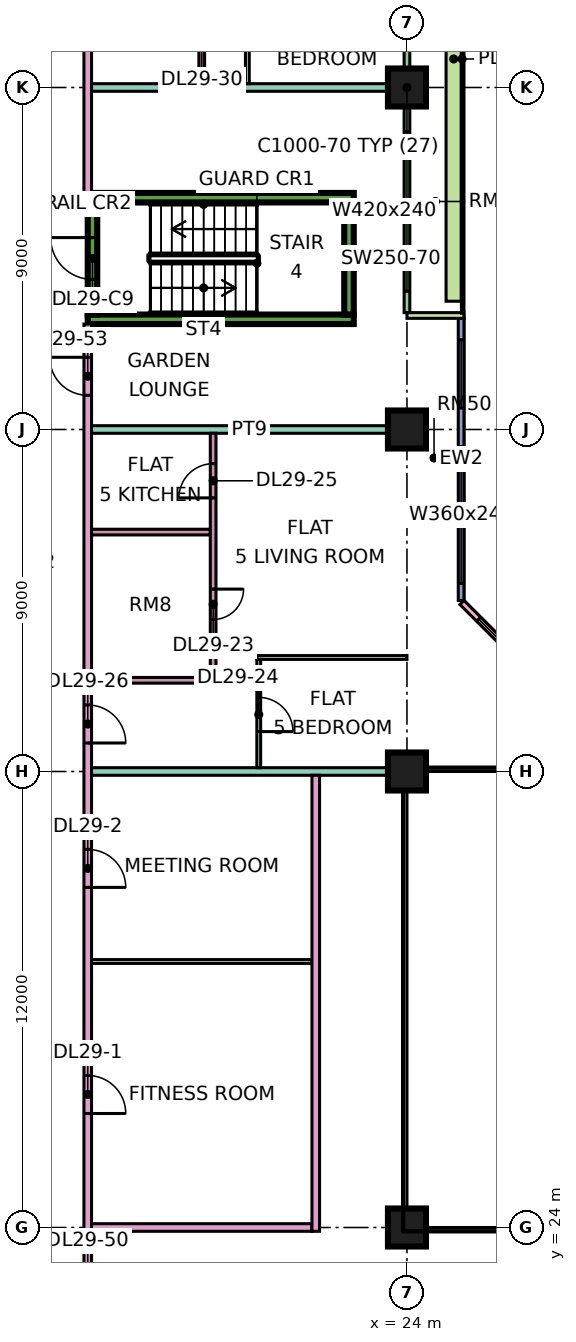
"""IFC4 building model, lengths in metres.
Left out: names, types, materials, properties, quantities, classifications, styles, units other than length and angle.
Written with IfcOpenShell. Run it as: python <this file> out.ifc"""

import sys

from ifc_helpers import new_model, si_unit, direction, frame, frame_2d, origin, origin_2d, place, context, subcontext, project, spatial, rectangle, extrude, element, fill, save


model = new_model("IFC4")
c1 = context("Model", 3, precision=1e-05, world=origin(), true_north=direction((0.0, 1.0)))
c2 = subcontext(c1, "Body", "Model", "MODEL_VIEW")
j1 = project(units=[si_unit("LENGTHUNIT", "METRE"), si_unit("PLANEANGLEUNIT", "RADIAN")], contexts=[c1])
p1 = place(None, origin())
s1 = spatial("IfcSite", under=j1, at=p1, CompositionType="ELEMENT")
p2 = place(p1, origin())
s2 = spatial("IfcBuilding", under=s1, at=p2, CompositionType="ELEMENT")
p3 = place(p2, frame((0.0, 0.0, 125.65)))
s3 = spatial("IfcBuildingStorey", under=s2, at=p3, CompositionType="ELEMENT", Elevation=125.65)
for number, where, z_axis, x_axis in (
    (1, (24.0, 24.0, 0.0), (0.0, 0.0, 1.0), (1.0, 0.0, 0.0)),
    (2, (24.0, 36.0, 0.0), (0.0, 0.0, 1.0), (1.0, 0.0, 0.0)),
    (3, (24.0, 45.0, 0.0), (0.0, 0.0, 1.0), (1.0, 0.0, 0.0)),
    (4, (24.0, 54.0, 0.0), (0.0, 0.0, 1.0), (1.0, 0.0, 0.0)),
):
    element("IfcColumn", number, at=place(p3, frame(where, z_axis=z_axis, x_axis=x_axis)), inside=s3, PredefinedType="COLUMN", context=c2, shape_type="SweptSolid", body=[
        extrude(rectangle(XDim=1.0, YDim=1.0, at=origin_2d()), origin(), (0.0, 0.0, 1.0), 3.75),
    ])
for number, where, z_axis, x_axis in (
    (5, (15.6, 47.9, 0.0), (0.0, 0.0, 1.0), (1.0, 0.0, 0.0)),
    (6, (15.6, 51.1, 0.0), (0.0, 0.0, 1.0), (1.0, 0.0, 0.0)),
):
    element("IfcWall", number, at=place(p3, frame(where, z_axis=z_axis, x_axis=x_axis)), inside=s3, PredefinedType="SHEAR", context=c2, shape_type="SweptSolid", body=[
        extrude(rectangle(XDim=7.0, YDim=0.25, at=frame_2d((3.5, 0.0))), origin(), (0.0, 0.0, 1.0), 3.75),
    ])
p4 = place(p3, frame((15.725, 48.025, 0.0), z_axis=(0.0, 0.0, 1.0), x_axis=(0.0, 1.0, 0.0)))
e7 = element("IfcWall", 7, at=p4, inside=s3, PredefinedType="SHEAR", context=c2, shape_type="SweptSolid", body=[
    extrude(rectangle(XDim=2.95, YDim=0.25, at=frame_2d((1.475, 0.0))), origin(), (0.0, 0.0, 1.0), 3.75),
])
p5 = place(p4, frame((0.925, 0.0, 0.0)))
e8 = element("IfcOpeningElement", 8, at=p5, cuts=e7, PredefinedType="OPENING", context=c2, shape_type="SweptSolid", body=[
    extrude(rectangle(XDim=1.1, YDim=2.2, at=frame_2d((0.55, 1.1))), frame((0.0, 0.135, 0.0), z_axis=(0.0, -1.0, 0.0), x_axis=(1.0, 0.0, 0.0)), (0.0, 0.0, 1.0), 0.27),
])
p6 = place(p3, frame((22.475, 48.025, 0.0), z_axis=(0.0, 0.0, 1.0), x_axis=(0.0, 1.0, 0.0)))
e9 = element("IfcWall", 9, at=p6, inside=s3, PredefinedType="SHEAR", context=c2, shape_type="SweptSolid", body=[
    extrude(rectangle(XDim=2.95, YDim=0.25, at=frame_2d((1.475, 0.0))), origin(), (0.0, 0.0, 1.0), 3.75),
])
p7 = place(p3, frame((28.447, 37.447, 0.0), z_axis=(0.0, 0.0, 1.0), x_axis=(-0.707106781187, 0.707106781187, 0.0)))
e10 = element("IfcWall", 10, at=p7, inside=s3, PredefinedType="SOLIDWALL", context=c2, shape_type="SweptSolid", body=[
    extrude(rectangle(XDim=4.243, YDim=0.15, at=frame_2d((2.121, 0.0))), origin(), (0.0, 0.0, 1.0), 3.35),
])
p8 = place(p7, frame((0.621, 0.0, 0.45)))
e11 = element("IfcOpeningElement", 11, at=p8, cuts=e10, PredefinedType="OPENING", context=c2, shape_type="SweptSolid", body=[
    extrude(rectangle(XDim=3.0, YDim=2.4, at=frame_2d((1.5, 1.2))), frame((0.0, 0.085, 0.0), z_axis=(0.0, -1.0, 0.0), x_axis=(1.0, 0.0, 0.0)), (0.0, 0.0, 1.0), 0.17),
])
p9 = place(p3, frame((25.425, 40.5, 0.0), z_axis=(0.0, 0.0, 1.0), x_axis=(0.0, 1.0, 0.0)))
e12 = element("IfcWall", 12, at=p9, inside=s3, PredefinedType="SOLIDWALL", context=c2, shape_type="SweptSolid", body=[
    extrude(rectangle(XDim=7.425, YDim=0.15, at=frame_2d((3.712, 0.0))), origin(), (0.0, 0.0, 1.0), 3.35),
])
p10 = place(p9, frame((0.45, 0.0, 0.45)))
e13 = element("IfcOpeningElement", 13, at=p10, cuts=e12, PredefinedType="OPENING", context=c2, shape_type="SweptSolid", body=[
    extrude(rectangle(XDim=3.6, YDim=2.4, at=frame_2d((1.8, 1.2))), frame((0.0, 0.085, 0.0), z_axis=(0.0, -1.0, 0.0), x_axis=(1.0, 0.0, 0.0)), (0.0, 0.0, 1.0), 0.17),
])
p11 = place(p9, frame((5.062, 0.0, 0.45)))
e14 = element("IfcOpeningElement", 14, at=p11, cuts=e12, PredefinedType="OPENING", context=c2, shape_type="SweptSolid", body=[
    extrude(rectangle(XDim=1.8, YDim=2.4, at=frame_2d((0.9, 1.2))), frame((0.0, 0.085, 0.0), z_axis=(0.0, -1.0, 0.0), x_axis=(1.0, 0.0, 0.0)), (0.0, 0.0, 1.0), 0.17),
])
p12 = place(p3, frame((24.0, 48.075, 0.0), z_axis=(0.0, 0.0, 1.0), x_axis=(0.0, 1.0, 0.0)))
e15 = element("IfcWall", 15, at=p12, inside=s3, PredefinedType="SOLIDWALL", context=c2, shape_type="SweptSolid", body=[
    extrude(rectangle(XDim=13.35, YDim=0.15, at=frame_2d((6.675, 0.0))), origin(), (0.0, 0.0, 1.0), 3.35),
])
p13 = place(p12, frame((0.562, 0.0, 0.45)))
e16 = element("IfcOpeningElement", 16, at=p13, cuts=e15, PredefinedType="OPENING", context=c2, shape_type="SweptSolid", body=[
    extrude(rectangle(XDim=4.2, YDim=2.4, at=frame_2d((2.1, 1.2))), frame((0.0, 0.085, 0.0), z_axis=(0.0, -1.0, 0.0), x_axis=(1.0, 0.0, 0.0)), (0.0, 0.0, 1.0), 0.17),
])
p14 = place(p12, frame((7.125, 0.0, 0.0)))
e17 = element("IfcOpeningElement", 17, at=p14, cuts=e15, PredefinedType="OPENING", context=c2, shape_type="SweptSolid", body=[
    extrude(rectangle(XDim=1.2, YDim=2.4, at=frame_2d((0.6, 1.2))), frame((0.0, 0.085, 0.0), z_axis=(0.0, -1.0, 0.0), x_axis=(1.0, 0.0, 0.0)), (0.0, 0.0, 1.0), 0.17),
])
p15 = place(p12, frame((9.525, 0.0, 0.45)))
e18 = element("IfcOpeningElement", 18, at=p15, cuts=e15, PredefinedType="OPENING", context=c2, shape_type="SweptSolid", body=[
    extrude(rectangle(XDim=1.8, YDim=2.4, at=frame_2d((0.9, 1.2))), frame((0.0, 0.085, 0.0), z_axis=(0.0, -1.0, 0.0), x_axis=(1.0, 0.0, 0.0)), (0.0, 0.0, 1.0), 0.17),
])
p16 = place(p3, frame((25.5, 48.0, 0.0), z_axis=(0.0, 0.0, 1.0), x_axis=(-1.0, 0.0, 0.0)))
e19 = element("IfcWall", 19, at=p16, inside=s3, PredefinedType="SOLIDWALL", context=c2, shape_type="SweptSolid", body=[
    extrude(rectangle(XDim=1.5, YDim=0.15, at=frame_2d((0.75, 0.0))), origin(), (0.0, 0.0, 1.0), 3.35),
])
p17 = place(p3, frame((25.229, 48.375, 0.0), z_axis=(0.0, 0.0, 1.0), x_axis=(0.0, 1.0, 0.0)))
e20 = element("IfcWall", 20, at=p17, inside=s3, PredefinedType="SOLIDWALL", context=c2, shape_type="SweptSolid", body=[
    extrude(rectangle(XDim=12.75, YDim=0.4, at=frame_2d((6.375, 0.0))), origin(), (0.0, 0.0, 1.0), 0.7),
])
p18 = place(p3, frame((15.6, 20.0, 0.0), z_axis=(0.0, 0.0, 1.0), x_axis=(0.0, 1.0, 0.0)))
e21 = element("IfcWall", 21, at=p18, inside=s3, PredefinedType="PARTITIONING", context=c2, shape_type="SweptSolid", body=[
    extrude(rectangle(XDim=27.775, YDim=0.2, at=frame_2d((13.887, 0.0))), origin(), (0.0, 0.0, 1.0), 3.35),
])
p19 = place(p18, frame((7.0, 0.0, 0.0)))
e22 = element("IfcOpeningElement", 22, at=p19, cuts=e21, PredefinedType="OPENING", context=c2, shape_type="SweptSolid", body=[
    extrude(rectangle(XDim=1.0, YDim=2.1, at=frame_2d((0.5, 1.05))), frame((0.0, 0.11, 0.0), z_axis=(0.0, -1.0, 0.0), x_axis=(1.0, 0.0, 0.0)), (0.0, 0.0, 1.0), 0.22),
])
p20 = place(p18, frame((12.95, 0.0, 0.0)))
e23 = element("IfcOpeningElement", 23, at=p20, cuts=e21, PredefinedType="OPENING", context=c2, shape_type="SweptSolid", body=[
    extrude(rectangle(XDim=1.0, YDim=2.1, at=frame_2d((0.5, 1.05))), frame((0.0, 0.11, 0.0), z_axis=(0.0, -1.0, 0.0), x_axis=(1.0, 0.0, 0.0)), (0.0, 0.0, 1.0), 0.22),
])
p21 = place(p18, frame((16.75, 0.0, 0.0)))
e24 = element("IfcOpeningElement", 24, at=p21, cuts=e21, PredefinedType="OPENING", context=c2, shape_type="SweptSolid", body=[
    extrude(rectangle(XDim=1.0, YDim=2.1, at=frame_2d((0.5, 1.05))), frame((0.0, 0.11, 0.0), z_axis=(0.0, -1.0, 0.0), x_axis=(1.0, 0.0, 0.0)), (0.0, 0.0, 1.0), 0.22),
])
p22 = place(p18, frame((1.15, 0.0, 0.0)))
e25 = element("IfcOpeningElement", 25, at=p22, cuts=e21, PredefinedType="OPENING", context=c2, shape_type="SweptSolid", body=[
    extrude(rectangle(XDim=1.8, YDim=2.1, at=frame_2d((0.9, 1.05))), frame((0.0, 0.11, 0.0), z_axis=(0.0, -1.0, 0.0), x_axis=(1.0, 0.0, 0.0)), (0.0, 0.0, 1.0), 0.22),
])
p23 = place(p18, frame((25.9, 0.0, 0.0)))
e26 = element("IfcOpeningElement", 26, at=p23, cuts=e21, PredefinedType="OPENING", context=c2, shape_type="SweptSolid", body=[
    extrude(rectangle(XDim=1.0, YDim=2.1, at=frame_2d((0.5, 1.05))), frame((0.0, 0.11, 0.0), z_axis=(0.0, -1.0, 0.0), x_axis=(1.0, 0.0, 0.0)), (0.0, 0.0, 1.0), 0.22),
])
p24 = place(p3, frame((15.6, 51.225, 0.0), z_axis=(0.0, 0.0, 1.0), x_axis=(0.0, 1.0, 0.0)))
e27 = element("IfcWall", 27, at=p24, inside=s3, PredefinedType="PARTITIONING", context=c2, shape_type="SweptSolid", body=[
    extrude(rectangle(XDim=13.125, YDim=0.2, at=frame_2d((6.562, 0.0))), origin(), (0.0, 0.0, 1.0), 3.35),
])
p25 = place(p24, frame((9.975, 0.0, 0.0)))
e28 = element("IfcOpeningElement", 28, at=p25, cuts=e27, PredefinedType="OPENING", context=c2, shape_type="SweptSolid", body=[
    extrude(rectangle(XDim=1.0, YDim=2.1, at=frame_2d((0.5, 1.05))), frame((0.0, 0.11, 0.0), z_axis=(0.0, -1.0, 0.0), x_axis=(1.0, 0.0, 0.0)), (0.0, 0.0, 1.0), 0.22),
])
p26 = place(p3, frame((15.7, 24.0, 0.0), z_axis=(0.0, 0.0, 1.0), x_axis=(1.0, 0.0, 0.0)))
e29 = element("IfcWall", 29, at=p26, inside=s3, PredefinedType="PARTITIONING", context=c2, shape_type="SweptSolid", body=[
    extrude(rectangle(XDim=5.8, YDim=0.2, at=frame_2d((2.9, 0.0))), origin(), (0.0, 0.0, 1.0), 3.35),
])
p27 = place(p3, frame((15.7, 31.0, 0.0), z_axis=(0.0, 0.0, 1.0), x_axis=(1.0, 0.0, 0.0)))
e30 = element("IfcWall", 30, at=p27, inside=s3, PredefinedType="PARTITIONING", context=c2, shape_type="SweptSolid", body=[
    extrude(rectangle(XDim=5.8, YDim=0.1, at=frame_2d((2.9, 0.0))), origin(), (0.0, 0.0, 1.0), 3.35),
])
p28 = place(p3, frame((15.7, 36.0, 0.0), z_axis=(0.0, 0.0, 1.0), x_axis=(1.0, 0.0, 0.0)))
e31 = element("IfcWall", 31, at=p28, inside=s3, PredefinedType="PARTITIONING", context=c2, shape_type="SweptSolid", body=[
    extrude(rectangle(XDim=8.3, YDim=0.2, at=frame_2d((4.15, 0.0))), origin(), (0.0, 0.0, 1.0), 3.35),
])
for number, where, z_axis, x_axis in (
    (32, (15.7, 38.4, 0.0), (0.0, 0.0, 1.0), (1.0, 0.0, 0.0)),
    (33, (15.7, 42.3, 0.0), (0.0, 0.0, 1.0), (1.0, 0.0, 0.0)),
):
    element("IfcWall", number, at=place(p3, frame(where, z_axis=z_axis, x_axis=x_axis)), inside=s3, PredefinedType="PARTITIONING", context=c2, shape_type="SweptSolid", body=[
        extrude(rectangle(XDim=3.125, YDim=0.15, at=frame_2d((1.562, 0.0))), origin(), (0.0, 0.0, 1.0), 3.35),
    ])
p29 = place(p3, frame((15.7, 45.0, 0.0), z_axis=(0.0, 0.0, 1.0), x_axis=(1.0, 0.0, 0.0)))
e34 = element("IfcWall", 34, at=p29, inside=s3, PredefinedType="PARTITIONING", context=c2, shape_type="SweptSolid", body=[
    extrude(rectangle(XDim=8.3, YDim=0.2, at=frame_2d((4.15, 0.0))), origin(), (0.0, 0.0, 1.0), 3.35),
])
p30 = place(p3, frame((15.7, 54.0, 0.0), z_axis=(0.0, 0.0, 1.0), x_axis=(1.0, 0.0, 0.0)))
e35 = element("IfcWall", 35, at=p30, inside=s3, PredefinedType="PARTITIONING", context=c2, shape_type="SweptSolid", body=[
    extrude(rectangle(XDim=8.226, YDim=0.2, at=frame_2d((4.113, 0.0))), origin(), (0.0, 0.0, 1.0), 3.35),
])
p31 = place(p3, frame((18.6, 54.1, 0.0), z_axis=(0.0, 0.0, 1.0), x_axis=(0.0, 1.0, 0.0)))
e36 = element("IfcWall", 36, at=p31, inside=s3, PredefinedType="PARTITIONING", context=c2, shape_type="SweptSolid", body=[
    extrude(rectangle(XDim=6.275, YDim=0.15, at=frame_2d((3.137, 0.0))), origin(), (0.0, 0.0, 1.0), 3.35),
])
p32 = place(p31, frame((4.5, 0.0, 0.0)))
e37 = element("IfcOpeningElement", 37, at=p32, cuts=e36, PredefinedType="OPENING", context=c2, shape_type="SweptSolid", body=[
    extrude(rectangle(XDim=0.8, YDim=2.1, at=frame_2d((0.4, 1.05))), frame((0.0, 0.085, 0.0), z_axis=(0.0, -1.0, 0.0), x_axis=(1.0, 0.0, 0.0)), (0.0, 0.0, 1.0), 0.17),
])
p33 = place(p31, frame((1.25, 0.0, 0.0)))
e38 = element("IfcOpeningElement", 38, at=p33, cuts=e36, PredefinedType="OPENING", context=c2, shape_type="SweptSolid", body=[
    extrude(rectangle(XDim=0.9, YDim=2.1, at=frame_2d((0.45, 1.05))), frame((0.0, 0.085, 0.0), z_axis=(0.0, -1.0, 0.0), x_axis=(1.0, 0.0, 0.0)), (0.0, 0.0, 1.0), 0.17),
])
p34 = place(p3, frame((18.9, 38.325, 0.0), z_axis=(0.0, 0.0, 1.0), x_axis=(0.0, 1.0, 0.0)))
e39 = element("IfcWall", 39, at=p34, inside=s3, PredefinedType="PARTITIONING", context=c2, shape_type="SweptSolid", body=[
    extrude(rectangle(XDim=6.575, YDim=0.15, at=frame_2d((3.288, 0.0))), origin(), (0.0, 0.0, 1.0), 3.35),
])
p35 = place(p34, frame((1.675, 0.0, 0.0)))
e40 = element("IfcOpeningElement", 40, at=p35, cuts=e39, PredefinedType="OPENING", context=c2, shape_type="SweptSolid", body=[
    extrude(rectangle(XDim=0.8, YDim=2.1, at=frame_2d((0.4, 1.05))), frame((0.0, 0.085, 0.0), z_axis=(0.0, -1.0, 0.0), x_axis=(1.0, 0.0, 0.0)), (0.0, 0.0, 1.0), 0.17),
])
p36 = place(p34, frame((4.875, 0.0, 0.0)))
e41 = element("IfcOpeningElement", 41, at=p36, cuts=e39, PredefinedType="OPENING", context=c2, shape_type="SweptSolid", body=[
    extrude(rectangle(XDim=0.9, YDim=2.1, at=frame_2d((0.45, 1.05))), frame((0.0, 0.085, 0.0), z_axis=(0.0, -1.0, 0.0), x_axis=(1.0, 0.0, 0.0)), (0.0, 0.0, 1.0), 0.17),
])
p37 = place(p3, frame((19.8, 54.1, 0.0), z_axis=(0.0, 0.0, 1.0), x_axis=(0.0, 1.0, 0.0)))
e42 = element("IfcWall", 42, at=p37, inside=s3, PredefinedType="PARTITIONING", context=c2, shape_type="SweptSolid", body=[
    extrude(rectangle(XDim=5.95, YDim=0.1, at=frame_2d((2.975, 0.0))), origin(), (0.0, 0.0, 1.0), 3.35),
])
p38 = place(p37, frame((0.95, 0.0, 0.0)))
e43 = element("IfcOpeningElement", 43, at=p38, cuts=e42, PredefinedType="OPENING", context=c2, shape_type="SweptSolid", body=[
    extrude(rectangle(XDim=0.9, YDim=2.1, at=frame_2d((0.45, 1.05))), frame((0.0, 0.06, 0.0), z_axis=(0.0, -1.0, 0.0), x_axis=(1.0, 0.0, 0.0)), (0.0, 0.0, 1.0), 0.12),
])
p39 = place(p3, frame((20.05, 39.0, 0.0), z_axis=(0.0, 0.0, 1.0), x_axis=(1.0, 0.0, 0.0)))
e44 = element("IfcWall", 44, at=p39, inside=s3, PredefinedType="PARTITIONING", context=c2, shape_type="SweptSolid", body=[
    extrude(rectangle(XDim=3.95, YDim=0.1, at=frame_2d((1.975, 0.0))), origin(), (0.0, 0.0, 1.0), 3.35),
])
p40 = place(p3, frame((20.1, 36.1, 0.0), z_axis=(0.0, 0.0, 1.0), x_axis=(0.0, 1.0, 0.0)))
e45 = element("IfcWall", 45, at=p40, inside=s3, PredefinedType="PARTITIONING", context=c2, shape_type="SweptSolid", body=[
    extrude(rectangle(XDim=2.85, YDim=0.1, at=frame_2d((1.425, 0.0))), origin(), (0.0, 0.0, 1.0), 3.35),
])
p41 = place(p40, frame((0.95, 0.0, 0.0)))
e46 = element("IfcOpeningElement", 46, at=p41, cuts=e45, PredefinedType="OPENING", context=c2, shape_type="SweptSolid", body=[
    extrude(rectangle(XDim=0.9, YDim=2.1, at=frame_2d((0.45, 1.05))), frame((0.0, 0.06, 0.0), z_axis=(0.0, -1.0, 0.0), x_axis=(1.0, 0.0, 0.0)), (0.0, 0.0, 1.0), 0.12),
])
p42 = place(p3, frame((21.6, 23.9, 0.0), z_axis=(0.0, 0.0, 1.0), x_axis=(0.0, 1.0, 0.0)))
e47 = element("IfcWall", 47, at=p42, inside=s3, PredefinedType="PARTITIONING", context=c2, shape_type="SweptSolid", body=[
    extrude(rectangle(XDim=12.0, YDim=0.2, at=frame_2d((6.0, 0.0))), origin(), (0.0, 0.0, 1.0), 3.35),
])
p43 = place(p8, origin())
e48 = element("IfcWindow", 48, at=p43, inside=s3, PartitioningType="SINGLE_PANEL", PredefinedType="WINDOW", context=c2, shape_type="SweptSolid", body=[
    extrude(rectangle(XDim=3.0, YDim=2.4, at=frame_2d((1.5, 1.2))), frame((0.0, 0.03, 0.0), z_axis=(0.0, -1.0, 0.0), x_axis=(1.0, 0.0, 0.0)), (0.0, 0.0, 1.0), 0.06),
])
fill(e11, e48)
p44 = place(p10, origin())
e49 = element("IfcWindow", 49, at=p44, inside=s3, PartitioningType="SINGLE_PANEL", PredefinedType="WINDOW", context=c2, shape_type="SweptSolid", body=[
    extrude(rectangle(XDim=3.6, YDim=2.4, at=frame_2d((1.8, 1.2))), frame((0.0, 0.03, 0.0), z_axis=(0.0, -1.0, 0.0), x_axis=(1.0, 0.0, 0.0)), (0.0, 0.0, 1.0), 0.06),
])
fill(e13, e49)
p45 = place(p11, origin())
e50 = element("IfcWindow", 50, at=p45, inside=s3, PartitioningType="SINGLE_PANEL", PredefinedType="WINDOW", context=c2, shape_type="SweptSolid", body=[
    extrude(rectangle(XDim=1.8, YDim=2.4, at=frame_2d((0.9, 1.2))), frame((0.0, 0.03, 0.0), z_axis=(0.0, -1.0, 0.0), x_axis=(1.0, 0.0, 0.0)), (0.0, 0.0, 1.0), 0.06),
])
fill(e14, e50)
p46 = place(p13, origin())
e51 = element("IfcWindow", 51, at=p46, inside=s3, PartitioningType="SINGLE_PANEL", PredefinedType="WINDOW", context=c2, shape_type="SweptSolid", body=[
    extrude(rectangle(XDim=4.2, YDim=2.4, at=frame_2d((2.1, 1.2))), frame((0.0, 0.03, 0.0), z_axis=(0.0, -1.0, 0.0), x_axis=(1.0, 0.0, 0.0)), (0.0, 0.0, 1.0), 0.06),
])
fill(e16, e51)
p47 = place(p5, frame((1.1, 0.0, 0.0), z_axis=(0.0, 0.0, 1.0), x_axis=(-1.0, 0.0, 0.0)))
e52 = element("IfcDoor", 52, at=p47, inside=s3, OperationType="SINGLE_SWING_RIGHT", PredefinedType="DOOR", context=c2, shape_type="SweptSolid", body=[
    extrude(rectangle(XDim=1.1, YDim=2.2, at=frame_2d((0.55, 1.1))), frame((0.0, 0.025, 0.0), z_axis=(0.0, -1.0, 0.0), x_axis=(1.0, 0.0, 0.0)), (0.0, 0.0, 1.0), 0.05),
])
fill(e8, e52)
p48 = place(p19, frame((1.0, 0.0, 0.0), z_axis=(0.0, 0.0, 1.0), x_axis=(-1.0, 0.0, 0.0)))
e53 = element("IfcDoor", 53, at=p48, inside=s3, OperationType="SINGLE_SWING_LEFT", PredefinedType="DOOR", context=c2, shape_type="SweptSolid", body=[
    extrude(rectangle(XDim=1.0, YDim=2.1, at=frame_2d((0.5, 1.05))), frame((0.0, 0.025, 0.0), z_axis=(0.0, -1.0, 0.0), x_axis=(1.0, 0.0, 0.0)), (0.0, 0.0, 1.0), 0.05),
])
fill(e22, e53)
p49 = place(p20, frame((1.0, 0.0, 0.0), z_axis=(0.0, 0.0, 1.0), x_axis=(-1.0, 0.0, 0.0)))
e54 = element("IfcDoor", 54, at=p49, inside=s3, OperationType="SINGLE_SWING_LEFT", PredefinedType="DOOR", context=c2, shape_type="SweptSolid", body=[
    extrude(rectangle(XDim=1.0, YDim=2.1, at=frame_2d((0.5, 1.05))), frame((0.0, 0.025, 0.0), z_axis=(0.0, -1.0, 0.0), x_axis=(1.0, 0.0, 0.0)), (0.0, 0.0, 1.0), 0.05),
])
fill(e23, e54)
p50 = place(p35, origin())
e55 = element("IfcDoor", 55, at=p50, inside=s3, OperationType="SINGLE_SWING_RIGHT", PredefinedType="DOOR", context=c2, shape_type="SweptSolid", body=[
    extrude(rectangle(XDim=0.8, YDim=2.1, at=frame_2d((0.4, 1.05))), frame((0.0, 0.025, 0.0), z_axis=(0.0, -1.0, 0.0), x_axis=(1.0, 0.0, 0.0)), (0.0, 0.0, 1.0), 0.05),
])
fill(e40, e55)
p51 = place(p41, frame((0.9, 0.0, 0.0), z_axis=(0.0, 0.0, 1.0), x_axis=(-1.0, 0.0, 0.0)))
e56 = element("IfcDoor", 56, at=p51, inside=s3, OperationType="SINGLE_SWING_LEFT", PredefinedType="DOOR", context=c2, shape_type="SweptSolid", body=[
    extrude(rectangle(XDim=0.9, YDim=2.1, at=frame_2d((0.45, 1.05))), frame((0.0, 0.025, 0.0), z_axis=(0.0, -1.0, 0.0), x_axis=(1.0, 0.0, 0.0)), (0.0, 0.0, 1.0), 0.05),
])
fill(e46, e56)
p52 = place(p36, origin())
e57 = element("IfcDoor", 57, at=p52, inside=s3, OperationType="SINGLE_SWING_LEFT", PredefinedType="DOOR", context=c2, shape_type="SweptSolid", body=[
    extrude(rectangle(XDim=0.9, YDim=2.1, at=frame_2d((0.45, 1.05))), frame((0.0, 0.025, 0.0), z_axis=(0.0, -1.0, 0.0), x_axis=(1.0, 0.0, 0.0)), (0.0, 0.0, 1.0), 0.05),
])
fill(e41, e57)
p53 = place(p21, frame((1.0, 0.0, 0.0), z_axis=(0.0, 0.0, 1.0), x_axis=(-1.0, 0.0, 0.0)))
e58 = element("IfcDoor", 58, at=p53, inside=s3, OperationType="SINGLE_SWING_LEFT", PredefinedType="DOOR", context=c2, shape_type="SweptSolid", body=[
    extrude(rectangle(XDim=1.0, YDim=2.1, at=frame_2d((0.5, 1.05))), frame((0.0, 0.025, 0.0), z_axis=(0.0, -1.0, 0.0), x_axis=(1.0, 0.0, 0.0)), (0.0, 0.0, 1.0), 0.05),
])
fill(e24, e58)
p54 = place(p23, frame((1.0, 0.0, 0.0), z_axis=(0.0, 0.0, 1.0), x_axis=(-1.0, 0.0, 0.0)))
e59 = element("IfcDoor", 59, at=p54, inside=s3, OperationType="SINGLE_SWING_RIGHT", PredefinedType="DOOR", context=c2, shape_type="SweptSolid", body=[
    extrude(rectangle(XDim=1.0, YDim=2.1, at=frame_2d((0.5, 1.05))), frame((0.0, 0.025, 0.0), z_axis=(0.0, -1.0, 0.0), x_axis=(1.0, 0.0, 0.0)), (0.0, 0.0, 1.0), 0.05),
])
fill(e26, e59)
save(model, sys.argv[1])
